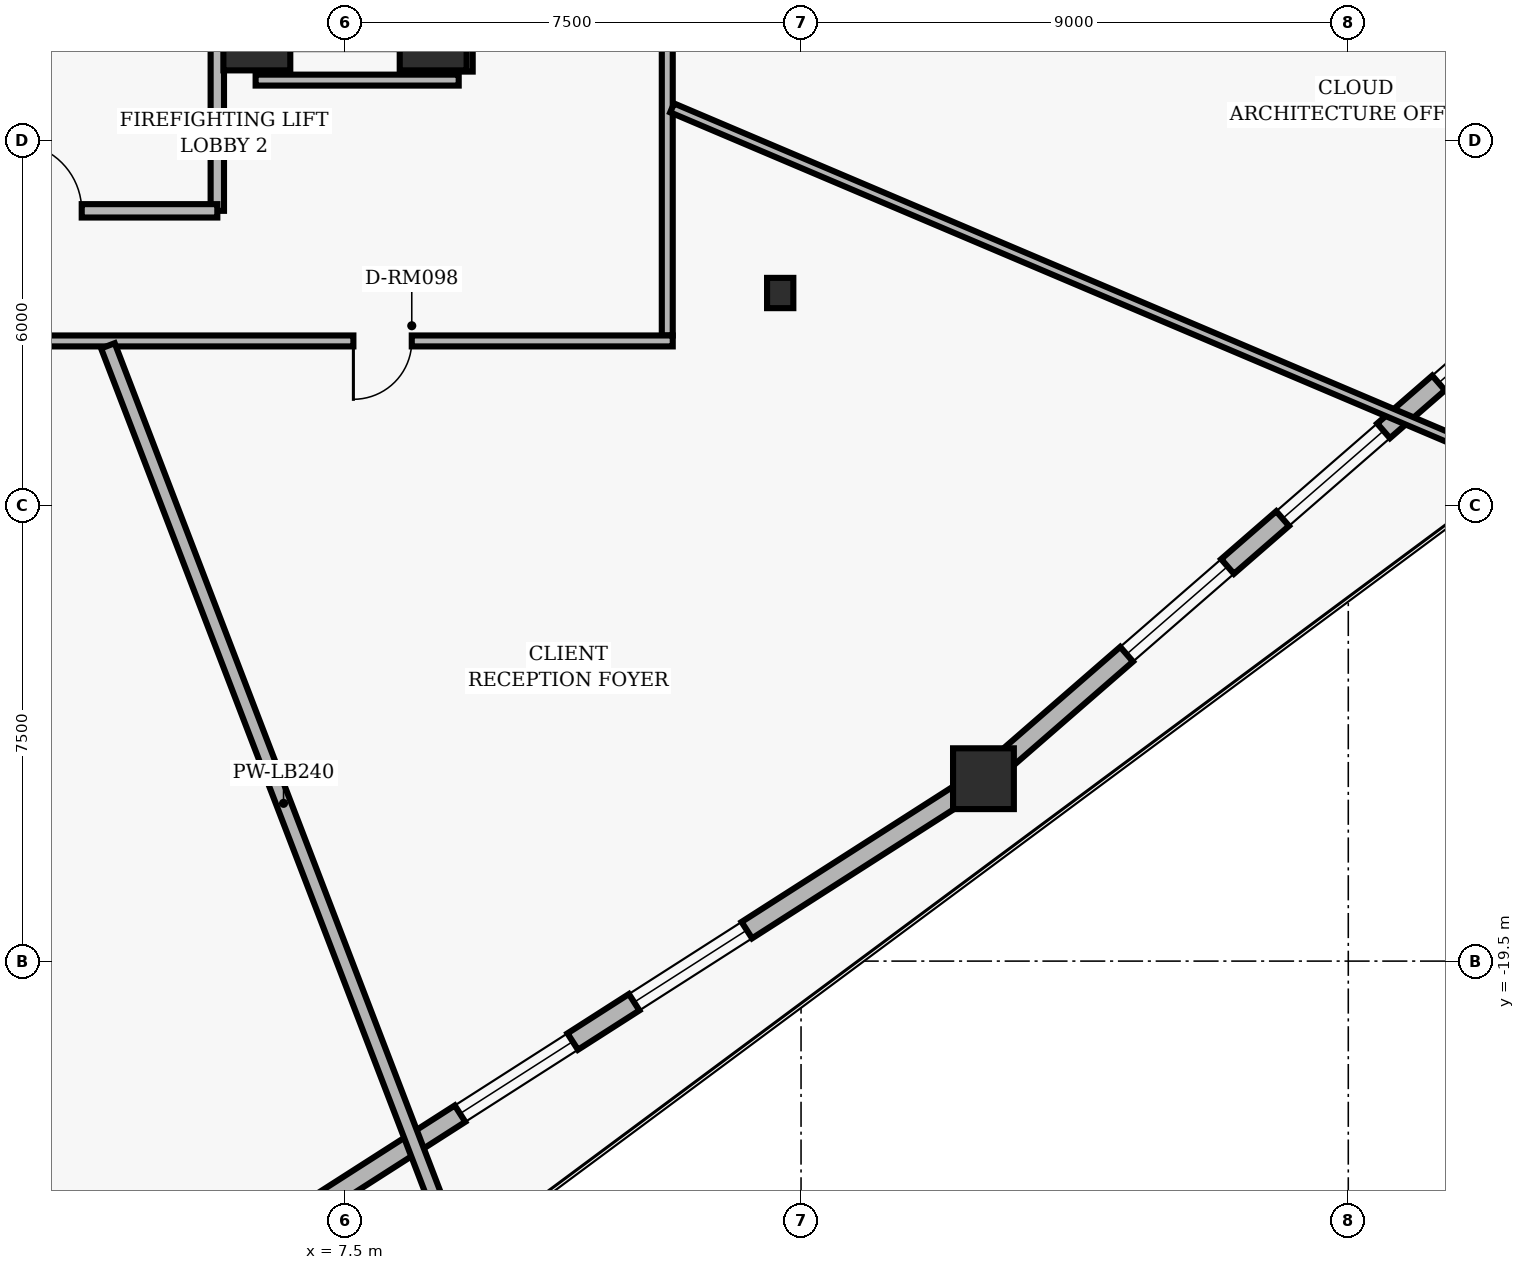
"""IFC4 building model, lengths in metres.
Left out: names, types, materials, properties, quantities, classifications, styles, units other than length and angle.
Written with IfcOpenShell. Run it as: python <this file> out.ifc"""

import sys

from ifc_helpers import new_model, si_unit, direction, frame, frame_2d, origin, origin_2d, place, context, subcontext, project, spatial, rectangle, hollow_rectangle, i_section, extrude, element, fill, save


model = new_model("IFC4")
c1 = context("Model", 3, precision=1e-05, world=origin(), true_north=direction((0.0, 1.0)))
c2 = subcontext(c1, "Body", "Model", "MODEL_VIEW")
j1 = project(units=[si_unit("LENGTHUNIT", "METRE"), si_unit("PLANEANGLEUNIT", "RADIAN")], contexts=[c1])
p1 = place(None, origin())
s1 = spatial("IfcSite", under=j1, at=p1, CompositionType="ELEMENT")
p2 = place(p1, origin())
s2 = spatial("IfcBuilding", under=s1, at=p2, CompositionType="ELEMENT")
p3 = place(p2, frame((0.0, 0.0, 15.36)))
s3 = spatial("IfcBuildingStorey", under=s2, at=p3, CompositionType="ELEMENT", Elevation=15.36)
for number, where, z_axis, x_axis in (
    (1, (6.05, -4.3, 0.0), (0.0, 0.0, 1.0), (1.0, 0.0, 0.0)),
    (2, (8.95, -4.3, 0.0), (0.0, 0.0, 1.0), (1.0, 0.0, 0.0)),
):
    element("IfcColumn", number, at=place(p3, frame(where, z_axis=z_axis, x_axis=x_axis)), inside=s3, PredefinedType="COLUMN", context=c2, shape_type="SweptSolid", body=[
        extrude(hollow_rectangle(XDim=1.1, YDim=1.1, WallThickness=0.07, InnerFilletRadius=0.02, OuterFilletRadius=0.04, at=origin_2d()), origin(), (0.0, 0.0, 1.0), 3.52),
    ])
p4 = place(p3, frame((18.0, -16.5, 0.0), z_axis=(0.0, 0.0, 1.0), x_axis=(1.0, 0.0, 0.0)))
e3 = element("IfcColumn", 3, at=p4, inside=s3, PredefinedType="COLUMN", context=c2, shape_type="SweptSolid", body=[
    extrude(rectangle(XDim=1.0, YDim=1.0, at=origin_2d()), origin(), (0.0, 0.0, 1.0), 3.52),
])
p5 = place(p3, frame((14.657, -8.512, 0.0), z_axis=(0.0, 0.0, 1.0), x_axis=(1.0, 0.0, 0.0)))
e4 = element("IfcColumn", 4, at=p5, inside=s3, PredefinedType="COLUMN", context=c2, shape_type="SweptSolid", body=[
    extrude(i_section(OverallWidth=0.432, OverallDepth=0.498, WebThickness=0.056, FlangeThickness=0.089, FilletRadius=0.025, at=origin_2d()), origin(), (0.0, 0.0, 1.0), 3.52),
])
p6 = place(p3, frame((17.562, -16.78, 0.0), z_axis=(0.0, 0.0, 1.0), x_axis=(-0.842268830443, -0.539057712368, 0.0)))
e5 = element("IfcWall", 5, at=p6, inside=s3, PredefinedType="SOLIDWALL", context=c2, shape_type="SweptSolid", body=[
    extrude(rectangle(XDim=13.801, YDim=0.32, at=frame_2d((6.9, 0.0))), origin(), (0.0, 0.0, 1.0), 1.65),
])
p7 = place(p6, frame((4.1, 0.0, 0.4)))
e6 = element("IfcOpeningElement", 6, at=p7, cuts=e5, PredefinedType="OPENING", context=c2, shape_type="SweptSolid", body=[
    extrude(rectangle(XDim=2.2, YDim=1.1, at=frame_2d((1.1, 0.55))), frame((0.0, 0.17, 0.0), z_axis=(0.0, -1.0, 0.0), x_axis=(1.0, 0.0, 0.0)), (0.0, 0.0, 1.0), 0.34),
])
p8 = place(p6, frame((7.5, 0.0, 0.4)))
e7 = element("IfcOpeningElement", 7, at=p8, cuts=e5, PredefinedType="OPENING", context=c2, shape_type="SweptSolid", body=[
    extrude(rectangle(XDim=2.2, YDim=1.1, at=frame_2d((1.1, 0.55))), frame((0.0, 0.17, 0.0), z_axis=(0.0, -1.0, 0.0), x_axis=(1.0, 0.0, 0.0)), (0.0, 0.0, 1.0), 0.34),
])
p9 = place(p3, frame((29.108, -6.841, 0.0), z_axis=(0.0, 0.0, 1.0), x_axis=(-0.754615886195, -0.656166796098, 0.0)))
e8 = element("IfcWall", 8, at=p9, inside=s3, PredefinedType="SOLIDWALL", context=c2, shape_type="SweptSolid", body=[
    extrude(rectangle(XDim=14.2, YDim=0.32, at=frame_2d((7.1, 0.0))), origin(), (0.0, 0.0, 1.0), 1.65),
])
p10 = place(p9, frame((2.6, 0.0, 0.4)))
e9 = element("IfcOpeningElement", 9, at=p10, cuts=e8, PredefinedType="OPENING", context=c2, shape_type="SweptSolid", body=[
    extrude(rectangle(XDim=2.2, YDim=1.1, at=frame_2d((1.1, 0.55))), frame((0.0, 0.17, 0.0), z_axis=(0.0, -1.0, 0.0), x_axis=(1.0, 0.0, 0.0)), (0.0, 0.0, 1.0), 0.34),
])
p11 = place(p9, frame((6.0, 0.0, 0.4)))
e10 = element("IfcOpeningElement", 10, at=p11, cuts=e8, PredefinedType="OPENING", context=c2, shape_type="SweptSolid", body=[
    extrude(rectangle(XDim=2.2, YDim=1.1, at=frame_2d((1.1, 0.55))), frame((0.0, 0.17, 0.0), z_axis=(0.0, -1.0, 0.0), x_axis=(1.0, 0.0, 0.0)), (0.0, 0.0, 1.0), 0.34),
])
p12 = place(p9, frame((9.4, 0.0, 0.4)))
e11 = element("IfcOpeningElement", 11, at=p12, cuts=e8, PredefinedType="OPENING", context=c2, shape_type="SweptSolid", body=[
    extrude(rectangle(XDim=2.2, YDim=1.1, at=frame_2d((1.1, 0.55))), frame((0.0, 0.17, 0.0), z_axis=(0.0, -1.0, 0.0), x_axis=(1.0, 0.0, 0.0)), (0.0, 0.0, 1.0), 0.34),
])
p13 = place(p3, frame((5.4, -7.16, 0.0), z_axis=(0.0, 0.0, 1.0), x_axis=(0.0, 1.0, 0.0)))
e12 = element("IfcWall", 12, at=p13, inside=s3, PredefinedType="PARTITIONING", context=c2, shape_type="SweptSolid", body=[
    extrude(rectangle(XDim=2.71, YDim=0.22, at=frame_2d((1.355, 0.0))), origin(), (0.0, 0.0, 1.0), 3.073),
])
p14 = place(p3, frame((0.0, -7.16, 0.0), z_axis=(0.0, 0.0, 1.0), x_axis=(1.0, 0.0, 0.0)))
e13 = element("IfcWall", 13, at=p14, inside=s3, PredefinedType="PARTITIONING", context=c2, shape_type="SweptSolid", body=[
    extrude(rectangle(XDim=5.4, YDim=0.22, at=frame_2d((2.7, 0.0))), origin(), (0.0, 0.0, 1.0), 3.073),
])
p15 = place(p14, frame((2.05, 0.0, 0.0)))
e14 = element("IfcOpeningElement", 14, at=p15, cuts=e13, PredefinedType="OPENING", context=c2, shape_type="SweptSolid", body=[
    extrude(rectangle(XDim=1.12, YDim=2.02, at=frame_2d((0.56, 1.01))), frame((0.0, 0.12, 0.0), z_axis=(0.0, -1.0, 0.0), x_axis=(1.0, 0.0, 0.0)), (0.0, 0.0, 1.0), 0.24),
])
p16 = place(p3, frame((12.8, -1.59, 0.0), z_axis=(0.0, 0.0, 1.0), x_axis=(0.0, -1.0, 0.0)))
e15 = element("IfcWall", 15, at=p16, inside=s3, PredefinedType="PARTITIONING", context=c2, shape_type="SweptSolid", body=[
    extrude(rectangle(XDim=7.62, YDim=0.18, at=frame_2d((3.81, 0.0))), origin(), (0.0, 0.0, 1.0), 3.073),
])
p17 = place(p3, frame((12.89, -9.3, 0.0), z_axis=(0.0, 0.0, 1.0), x_axis=(-1.0, 0.0, 0.0)))
e16 = element("IfcWall", 16, at=p17, inside=s3, PredefinedType="PARTITIONING", context=c2, shape_type="SweptSolid", body=[
    extrude(rectangle(XDim=25.78, YDim=0.18, at=frame_2d((12.89, 0.0))), origin(), (0.0, 0.0, 1.0), 2.587),
])
p18 = place(p17, frame((20.866, 0.0, 0.0)))
e17 = element("IfcOpeningElement", 17, at=p18, cuts=e16, PredefinedType="OPENING", context=c2, shape_type="SweptSolid", body=[
    extrude(rectangle(XDim=0.96, YDim=2.02, at=frame_2d((0.48, 1.01))), frame((0.0, 0.1, 0.0), z_axis=(0.0, -1.0, 0.0), x_axis=(1.0, 0.0, 0.0)), (0.0, 0.0, 1.0), 0.2),
])
p19 = place(p17, frame((12.748, 0.0, 0.0)))
e18 = element("IfcOpeningElement", 18, at=p19, cuts=e16, PredefinedType="OPENING", context=c2, shape_type="SweptSolid", body=[
    extrude(rectangle(XDim=0.96, YDim=2.02, at=frame_2d((0.48, 1.01))), frame((0.0, 0.1, 0.0), z_axis=(0.0, -1.0, 0.0), x_axis=(1.0, 0.0, 0.0)), (0.0, 0.0, 1.0), 0.2),
])
p20 = place(p17, frame((4.292, 0.0, 0.0)))
e19 = element("IfcOpeningElement", 19, at=p20, cuts=e16, PredefinedType="OPENING", context=c2, shape_type="SweptSolid", body=[
    extrude(rectangle(XDim=0.96, YDim=2.02, at=frame_2d((0.48, 1.01))), frame((0.0, 0.1, 0.0), z_axis=(0.0, -1.0, 0.0), x_axis=(1.0, 0.0, 0.0)), (0.0, 0.0, 1.0), 0.2),
])
p21 = place(p3, frame((6.03, -5.01, 0.0), z_axis=(0.0, 0.0, 1.0), x_axis=(1.0, 0.0, 0.0)))
e20 = element("IfcWall", 20, at=p21, inside=s3, PredefinedType="PARTITIONING", context=c2, shape_type="SweptSolid", body=[
    extrude(rectangle(XDim=3.34, YDim=0.18, at=frame_2d((1.67, 0.0))), origin(), (0.0, 0.0, 1.0), 3.073),
])
p22 = place(p3, frame((9.51, -4.87, 0.0), z_axis=(0.0, 0.0, 1.0), x_axis=(0.0, 1.0, 0.0)))
e21 = element("IfcWall", 21, at=p22, inside=s3, PredefinedType="PARTITIONING", context=c2, shape_type="SweptSolid", body=[
    extrude(rectangle(XDim=9.74, YDim=0.18, at=frame_2d((4.87, 0.0))), origin(), (0.0, 0.0, 1.0), 3.073),
])
p23 = place(p3, frame((3.601, -9.38, 0.0), z_axis=(0.0, 0.0, 1.0), x_axis=(0.358364010281, -0.933581938629, 0.0)))
e22 = element("IfcWall", 22, at=p23, inside=s3, PredefinedType="PARTITIONING", context=c2, shape_type="SweptSolid", body=[
    extrude(rectangle(XDim=16.121, YDim=0.24, at=frame_2d((8.061, 0.0))), origin(), (0.0, 0.0, 1.0), 3.073),
])
p24 = place(p3, frame((12.88, -5.467, 0.0), z_axis=(0.0, 0.0, 1.0), x_axis=(0.920509657283, -0.390719811181, 0.0)))
e23 = element("IfcWall", 23, at=p24, inside=s3, PredefinedType="PARTITIONING", context=c2, shape_type="SweptSolid", body=[
    extrude(rectangle(XDim=15.234, YDim=0.16, at=frame_2d((7.617, 0.0))), origin(), (0.0, 0.0, 1.0), 3.073),
])
p25 = place(p7, origin())
e24 = element("IfcWindow", 24, at=p25, inside=s3, PartitioningType="SINGLE_PANEL", PredefinedType="WINDOW", context=c2, shape_type="SweptSolid", body=[
    extrude(rectangle(XDim=2.2, YDim=1.1, at=frame_2d((1.1, 0.55))), frame((0.0, 0.03, 0.0), z_axis=(0.0, -1.0, 0.0), x_axis=(1.0, 0.0, 0.0)), (0.0, 0.0, 1.0), 0.06),
])
fill(e6, e24)
p26 = place(p8, origin())
e25 = element("IfcWindow", 25, at=p26, inside=s3, PartitioningType="SINGLE_PANEL", PredefinedType="WINDOW", context=c2, shape_type="SweptSolid", body=[
    extrude(rectangle(XDim=2.2, YDim=1.1, at=frame_2d((1.1, 0.55))), frame((0.0, 0.03, 0.0), z_axis=(0.0, -1.0, 0.0), x_axis=(1.0, 0.0, 0.0)), (0.0, 0.0, 1.0), 0.06),
])
fill(e7, e25)
p27 = place(p10, origin())
e26 = element("IfcWindow", 26, at=p27, inside=s3, PartitioningType="SINGLE_PANEL", PredefinedType="WINDOW", context=c2, shape_type="SweptSolid", body=[
    extrude(rectangle(XDim=2.2, YDim=1.1, at=frame_2d((1.1, 0.55))), frame((0.0, 0.03, 0.0), z_axis=(0.0, -1.0, 0.0), x_axis=(1.0, 0.0, 0.0)), (0.0, 0.0, 1.0), 0.06),
])
fill(e9, e26)
p28 = place(p11, origin())
e27 = element("IfcWindow", 27, at=p28, inside=s3, PartitioningType="SINGLE_PANEL", PredefinedType="WINDOW", context=c2, shape_type="SweptSolid", body=[
    extrude(rectangle(XDim=2.2, YDim=1.1, at=frame_2d((1.1, 0.55))), frame((0.0, 0.03, 0.0), z_axis=(0.0, -1.0, 0.0), x_axis=(1.0, 0.0, 0.0)), (0.0, 0.0, 1.0), 0.06),
])
fill(e10, e27)
p29 = place(p12, origin())
e28 = element("IfcWindow", 28, at=p29, inside=s3, PartitioningType="SINGLE_PANEL", PredefinedType="WINDOW", context=c2, shape_type="SweptSolid", body=[
    extrude(rectangle(XDim=2.2, YDim=1.1, at=frame_2d((1.1, 0.55))), frame((0.0, 0.03, 0.0), z_axis=(0.0, -1.0, 0.0), x_axis=(1.0, 0.0, 0.0)), (0.0, 0.0, 1.0), 0.06),
])
fill(e11, e28)
p30 = place(p15, origin())
e29 = element("IfcDoor", 29, at=p30, inside=s3, OperationType="SINGLE_SWING_LEFT", PredefinedType="DOOR", context=c2, shape_type="SweptSolid", body=[
    extrude(rectangle(XDim=1.12, YDim=2.02, at=frame_2d((0.56, 1.01))), frame((0.0, 0.025, 0.0), z_axis=(0.0, -1.0, 0.0), x_axis=(1.0, 0.0, 0.0)), (0.0, 0.0, 1.0), 0.05),
])
fill(e14, e29)
p31 = place(p20, origin())
e30 = element("IfcDoor", 30, at=p31, inside=s3, OperationType="SINGLE_SWING_RIGHT", PredefinedType="DOOR", context=c2, shape_type="SweptSolid", body=[
    extrude(rectangle(XDim=0.96, YDim=2.02, at=frame_2d((0.48, 1.01))), frame((0.0, 0.025, 0.0), z_axis=(0.0, -1.0, 0.0), x_axis=(1.0, 0.0, 0.0)), (0.0, 0.0, 1.0), 0.05),
])
fill(e19, e30)
save(model, sys.argv[1])
